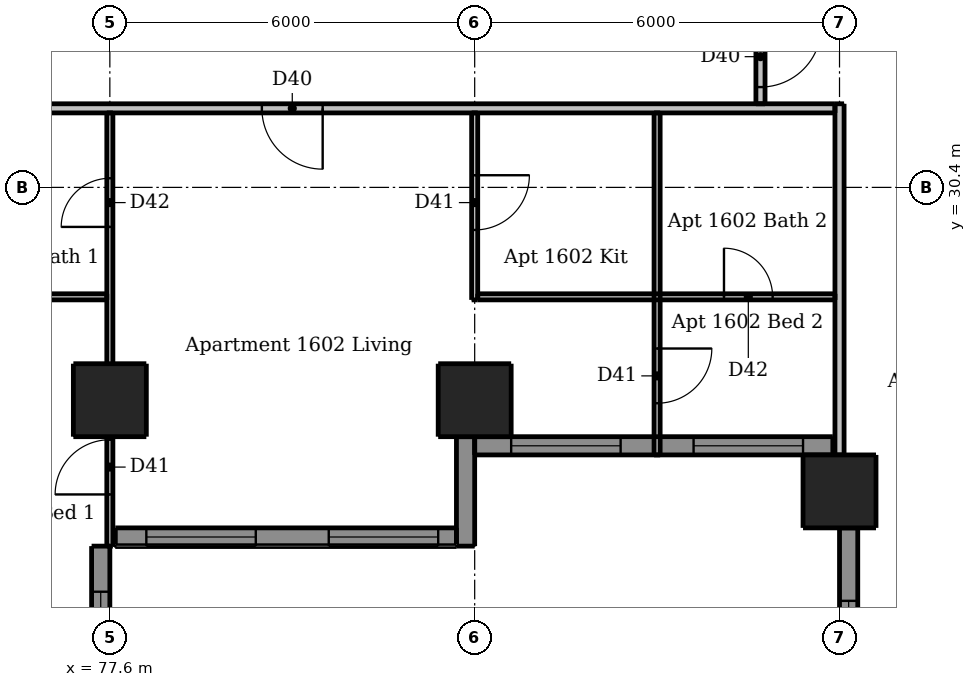
"""IFC4 building model, lengths in metres.
Left out: names, types, materials, properties, quantities, classifications, styles, units other than length and angle.
Written with IfcOpenShell. Run it as: python <this file> out.ifc"""

import sys

from ifc_helpers import new_model, si_unit, direction, frame, frame_2d, origin, origin_2d, place, context, subcontext, project, spatial, rectangle, extrude, element, fill, save


model = new_model("IFC4")
c1 = context("Model", 3, precision=1e-05, world=origin(), true_north=direction((0.0, 1.0)))
c2 = subcontext(c1, "Body", "Model", "MODEL_VIEW")
j1 = project(units=[si_unit("LENGTHUNIT", "METRE"), si_unit("PLANEANGLEUNIT", "RADIAN")], contexts=[c1])
p1 = place(None, origin())
s1 = spatial("IfcSite", under=j1, at=p1, CompositionType="ELEMENT")
p2 = place(p1, origin())
s2 = spatial("IfcBuilding", under=s1, at=p2, CompositionType="ELEMENT")
p3 = place(p2, frame((0.0, 0.0, 59.8)))
s3 = spatial("IfcBuildingStorey", under=s2, at=p3, CompositionType="ELEMENT", Elevation=59.8)
for number, where, z_axis, x_axis in (
    (1, (77.6, 26.9, 0.0), (0.0, 0.0, 1.0), (1.0, 0.0, 0.0)),
    (2, (83.6, 26.9, 0.0), (0.0, 0.0, 1.0), (1.0, 0.0, 0.0)),
    (3, (89.6, 25.4, 0.0), (0.0, 0.0, 1.0), (1.0, 0.0, 0.0)),
):
    element("IfcColumn", number, at=place(p3, frame(where, z_axis=z_axis, x_axis=x_axis)), inside=s3, PredefinedType="COLUMN", context=c2, shape_type="SweptSolid", body=[
        extrude(rectangle(XDim=1.2, YDim=1.2, at=origin_2d()), origin(), (0.0, 0.0, 1.0), 3.05),
    ])
p4 = place(p3, frame((77.45, 21.5, 0.0), z_axis=(0.0, 0.0, 1.0), x_axis=(0.0, 1.0, 0.0)))
e4 = element("IfcWall", 4, at=p4, inside=s3, PredefinedType="SOLIDWALL", context=c2, shape_type="SweptSolid", body=[
    extrude(rectangle(XDim=3.0, YDim=0.3, at=frame_2d((1.5, 0.0))), origin(), (0.0, 0.0, 1.0), 3.05),
])
p5 = place(p4, frame((0.75, 0.0, 0.9)))
e5 = element("IfcOpeningElement", 5, at=p5, cuts=e4, PredefinedType="OPENING", context=c2, shape_type="SweptSolid", body=[
    extrude(rectangle(XDim=1.5, YDim=1.5, at=frame_2d((0.75, 0.75))), frame((0.0, 0.16, 0.0), z_axis=(0.0, -1.0, 0.0), x_axis=(1.0, 0.0, 0.0)), (0.0, 0.0, 1.0), 0.32),
])
p6 = place(p3, frame((83.45, 24.5, 0.0), z_axis=(0.0, 0.0, 1.0), x_axis=(0.0, 1.0, 0.0)))
e6 = element("IfcWall", 6, at=p6, inside=s3, PredefinedType="SOLIDWALL", context=c2, shape_type="SweptSolid", body=[
    extrude(rectangle(XDim=1.8, YDim=0.3, at=frame_2d((0.9, 0.0))), origin(), (0.0, 0.0, 1.0), 3.05),
])
p7 = place(p3, frame((89.75, 24.8, 0.0), z_axis=(0.0, 0.0, 1.0), x_axis=(0.0, -1.0, 0.0)))
e7 = element("IfcWall", 7, at=p7, inside=s3, PredefinedType="SOLIDWALL", context=c2, shape_type="SweptSolid", body=[
    extrude(rectangle(XDim=4.8, YDim=0.3, at=frame_2d((2.4, 0.0))), origin(), (0.0, 0.0, 1.0), 3.05),
])
p8 = place(p7, frame((1.2, 0.0, 0.15)))
e8 = element("IfcOpeningElement", 8, at=p8, cuts=e7, PredefinedType="OPENING", context=c2, shape_type="SweptSolid", body=[
    extrude(rectangle(XDim=2.4, YDim=2.1, at=frame_2d((1.2, 1.05))), frame((0.0, 0.16, 0.0), z_axis=(0.0, -1.0, 0.0), x_axis=(1.0, 0.0, 0.0)), (0.0, 0.0, 1.0), 0.32),
])
p9 = place(p3, frame((77.69, 24.65, 0.0), z_axis=(0.0, 0.0, 1.0), x_axis=(1.0, 0.0, 0.0)))
e9 = element("IfcWall", 9, at=p9, inside=s3, PredefinedType="SOLIDWALL", context=c2, shape_type="SweptSolid", body=[
    extrude(rectangle(XDim=5.61, YDim=0.3, at=frame_2d((2.805, 0.0))), origin(), (0.0, 0.0, 1.0), 3.05),
])
p10 = place(p9, frame((0.51, 0.0, 0.15)))
e10 = element("IfcOpeningElement", 10, at=p10, cuts=e9, PredefinedType="OPENING", context=c2, shape_type="SweptSolid", body=[
    extrude(rectangle(XDim=1.8, YDim=2.1, at=frame_2d((0.9, 1.05))), frame((0.0, 0.16, 0.0), z_axis=(0.0, -1.0, 0.0), x_axis=(1.0, 0.0, 0.0)), (0.0, 0.0, 1.0), 0.32),
])
p11 = place(p9, frame((3.51, 0.0, 0.15)))
e11 = element("IfcOpeningElement", 11, at=p11, cuts=e9, PredefinedType="OPENING", context=c2, shape_type="SweptSolid", body=[
    extrude(rectangle(XDim=1.8, YDim=2.1, at=frame_2d((0.9, 1.05))), frame((0.0, 0.16, 0.0), z_axis=(0.0, -1.0, 0.0), x_axis=(1.0, 0.0, 0.0)), (0.0, 0.0, 1.0), 0.32),
])
p12 = place(p3, frame((83.6, 26.15, 0.0), z_axis=(0.0, 0.0, 1.0), x_axis=(1.0, 0.0, 0.0)))
e12 = element("IfcWall", 12, at=p12, inside=s3, PredefinedType="SOLIDWALL", context=c2, shape_type="SweptSolid", body=[
    extrude(rectangle(XDim=5.89, YDim=0.3, at=frame_2d((2.945, 0.0))), origin(), (0.0, 0.0, 1.0), 3.05),
])
p13 = place(p12, frame((0.6, 0.0, 0.15)))
e13 = element("IfcOpeningElement", 13, at=p13, cuts=e12, PredefinedType="OPENING", context=c2, shape_type="SweptSolid", body=[
    extrude(rectangle(XDim=1.8, YDim=2.1, at=frame_2d((0.9, 1.05))), frame((0.0, 0.16, 0.0), z_axis=(0.0, -1.0, 0.0), x_axis=(1.0, 0.0, 0.0)), (0.0, 0.0, 1.0), 0.32),
])
p14 = place(p12, frame((3.6, 0.0, 0.15)))
e14 = element("IfcOpeningElement", 14, at=p14, cuts=e12, PredefinedType="OPENING", context=c2, shape_type="SweptSolid", body=[
    extrude(rectangle(XDim=1.8, YDim=2.1, at=frame_2d((0.9, 1.05))), frame((0.0, 0.16, 0.0), z_axis=(0.0, -1.0, 0.0), x_axis=(1.0, 0.0, 0.0)), (0.0, 0.0, 1.0), 0.32),
])
p15 = place(p3, frame((77.6, 24.5, 0.0), z_axis=(0.0, 0.0, 1.0), x_axis=(0.0, 1.0, 0.0)))
e15 = element("IfcWall", 15, at=p15, inside=s3, PredefinedType="PARTITIONING", context=c2, shape_type="SweptSolid", body=[
    extrude(rectangle(XDim=7.125, YDim=0.1, at=frame_2d((3.562, 0.0))), origin(), (0.0, 0.0, 1.0), 2.59),
])
p16 = place(p15, frame((0.85, 0.0, 0.0)))
e16 = element("IfcOpeningElement", 16, at=p16, cuts=e15, PredefinedType="OPENING", context=c2, shape_type="SweptSolid", body=[
    extrude(rectangle(XDim=0.9, YDim=2.1, at=frame_2d((0.45, 1.05))), frame((0.0, 0.06, 0.0), z_axis=(0.0, -1.0, 0.0), x_axis=(1.0, 0.0, 0.0)), (0.0, 0.0, 1.0), 0.12),
])
p17 = place(p15, frame((5.25, 0.0, 0.0)))
e17 = element("IfcOpeningElement", 17, at=p17, cuts=e15, PredefinedType="OPENING", context=c2, shape_type="SweptSolid", body=[
    extrude(rectangle(XDim=0.8, YDim=2.1, at=frame_2d((0.4, 1.05))), frame((0.0, 0.06, 0.0), z_axis=(0.0, -1.0, 0.0), x_axis=(1.0, 0.0, 0.0)), (0.0, 0.0, 1.0), 0.12),
])
p18 = place(p3, frame((83.6, 31.625, 0.0), z_axis=(0.0, 0.0, 1.0), x_axis=(0.0, -1.0, 0.0)))
e18 = element("IfcWall", 18, at=p18, inside=s3, PredefinedType="PARTITIONING", context=c2, shape_type="SweptSolid", body=[
    extrude(rectangle(XDim=3.075, YDim=0.1, at=frame_2d((1.538, 0.0))), origin(), (0.0, 0.0, 1.0), 2.647),
])
p19 = place(p18, frame((1.025, 0.0, 0.0)))
e19 = element("IfcOpeningElement", 19, at=p19, cuts=e18, PredefinedType="OPENING", context=c2, shape_type="SweptSolid", body=[
    extrude(rectangle(XDim=0.9, YDim=2.1, at=frame_2d((0.45, 1.05))), frame((0.0, 0.06, 0.0), z_axis=(0.0, -1.0, 0.0), x_axis=(1.0, 0.0, 0.0)), (0.0, 0.0, 1.0), 0.12),
])
p20 = place(p3, frame((86.6, 31.625, 0.0), z_axis=(0.0, 0.0, 1.0), x_axis=(0.0, -1.0, 0.0)))
e20 = element("IfcWall", 20, at=p20, inside=s3, PredefinedType="PARTITIONING", context=c2, shape_type="SweptSolid", body=[
    extrude(rectangle(XDim=5.625, YDim=0.1, at=frame_2d((2.812, 0.0))), origin(), (0.0, 0.0, 1.0), 3.05),
])
p21 = place(p20, frame((3.875, 0.0, 0.0)))
e21 = element("IfcOpeningElement", 21, at=p21, cuts=e20, PredefinedType="OPENING", context=c2, shape_type="SweptSolid", body=[
    extrude(rectangle(XDim=0.9, YDim=2.1, at=frame_2d((0.45, 1.05))), frame((0.0, 0.06, 0.0), z_axis=(0.0, -1.0, 0.0), x_axis=(1.0, 0.0, 0.0)), (0.0, 0.0, 1.0), 0.12),
])
p22 = place(p3, frame((74.675, 28.6, 0.0), z_axis=(0.0, 0.0, 1.0), x_axis=(1.0, 0.0, 0.0)))
e22 = element("IfcWall", 22, at=p22, inside=s3, PredefinedType="PARTITIONING", context=c2, shape_type="SweptSolid", body=[
    extrude(rectangle(XDim=2.875, YDim=0.1, at=frame_2d((1.438, 0.0))), origin(), (0.0, 0.0, 1.0), 3.05),
])
p23 = place(p3, frame((83.65, 28.6, 0.0), z_axis=(0.0, 0.0, 1.0), x_axis=(1.0, 0.0, 0.0)))
e23 = element("IfcWall", 23, at=p23, inside=s3, PredefinedType="PARTITIONING", context=c2, shape_type="SweptSolid", body=[
    extrude(rectangle(XDim=5.875, YDim=0.1, at=frame_2d((2.938, 0.0))), origin(), (0.0, 0.0, 1.0), 3.05),
])
p24 = place(p23, frame((4.05, 0.0, 0.0)))
e24 = element("IfcOpeningElement", 24, at=p24, cuts=e23, PredefinedType="OPENING", context=c2, shape_type="SweptSolid", body=[
    extrude(rectangle(XDim=0.8, YDim=2.1, at=frame_2d((0.4, 1.05))), frame((0.0, 0.06, 0.0), z_axis=(0.0, -1.0, 0.0), x_axis=(1.0, 0.0, 0.0)), (0.0, 0.0, 1.0), 0.12),
])
p25 = place(p3, frame((88.3, 60.475, 0.0), z_axis=(0.0, 0.0, 1.0), x_axis=(0.0, -1.0, 0.0)))
e25 = element("IfcWall", 25, at=p25, inside=s3, PredefinedType="PARTITIONING", context=c2, shape_type="SweptSolid", body=[
    extrude(rectangle(XDim=28.7, YDim=0.15, at=frame_2d((14.35, 0.0))), origin(), (0.0, 0.0, 1.0), 3.05),
])
p26 = place(p25, frame((27.425, 0.0, 0.0)))
e26 = element("IfcOpeningElement", 26, at=p26, cuts=e25, PredefinedType="OPENING", context=c2, shape_type="SweptSolid", body=[
    extrude(rectangle(XDim=1.0, YDim=2.1, at=frame_2d((0.5, 1.05))), frame((0.0, 0.085, 0.0), z_axis=(0.0, -1.0, 0.0), x_axis=(1.0, 0.0, 0.0)), (0.0, 0.0, 1.0), 0.17),
])
p27 = place(p25, frame((14.525, 0.0, 0.0)))
e27 = element("IfcOpeningElement", 27, at=p27, cuts=e25, PredefinedType="OPENING", context=c2, shape_type="SweptSolid", body=[
    extrude(rectangle(XDim=1.0, YDim=2.1, at=frame_2d((0.5, 1.05))), frame((0.0, 0.085, 0.0), z_axis=(0.0, -1.0, 0.0), x_axis=(1.0, 0.0, 0.0)), (0.0, 0.0, 1.0), 0.17),
])
p28 = place(p25, frame((3.775, 0.0, 0.0)))
e28 = element("IfcOpeningElement", 28, at=p28, cuts=e25, PredefinedType="OPENING", context=c2, shape_type="SweptSolid", body=[
    extrude(rectangle(XDim=1.0, YDim=2.1, at=frame_2d((0.5, 1.05))), frame((0.0, 0.085, 0.0), z_axis=(0.0, -1.0, 0.0), x_axis=(1.0, 0.0, 0.0)), (0.0, 0.0, 1.0), 0.17),
])
p29 = place(p3, frame((89.6, 26.0, 0.0), z_axis=(0.0, 0.0, 1.0), x_axis=(0.0, 1.0, 0.0)))
e29 = element("IfcWall", 29, at=p29, inside=s3, PredefinedType="PARTITIONING", context=c2, shape_type="SweptSolid", body=[
    extrude(rectangle(XDim=5.775, YDim=0.15, at=frame_2d((2.887, 0.0))), origin(), (0.0, 0.0, 1.0), 2.516),
])
p30 = place(p3, frame((89.525, 31.7, 0.0), z_axis=(0.0, 0.0, 1.0), x_axis=(-1.0, 0.0, 0.0)))
e30 = element("IfcWall", 30, at=p30, inside=s3, PredefinedType="PARTITIONING", context=c2, shape_type="SweptSolid", body=[
    extrude(rectangle(XDim=28.75, YDim=0.15, at=frame_2d((14.375, 0.0))), origin(), (0.0, 0.0, 1.0), 3.05),
])
p31 = place(p30, frame((24.625, 0.0, 0.0)))
e31 = element("IfcOpeningElement", 31, at=p31, cuts=e30, PredefinedType="OPENING", context=c2, shape_type="SweptSolid", body=[
    extrude(rectangle(XDim=1.0, YDim=2.1, at=frame_2d((0.5, 1.05))), frame((0.0, 0.085, 0.0), z_axis=(0.0, -1.0, 0.0), x_axis=(1.0, 0.0, 0.0)), (0.0, 0.0, 1.0), 0.17),
])
p32 = place(p30, frame((8.425, 0.0, 0.0)))
e32 = element("IfcOpeningElement", 32, at=p32, cuts=e30, PredefinedType="OPENING", context=c2, shape_type="SweptSolid", body=[
    extrude(rectangle(XDim=1.0, YDim=2.1, at=frame_2d((0.5, 1.05))), frame((0.0, 0.085, 0.0), z_axis=(0.0, -1.0, 0.0), x_axis=(1.0, 0.0, 0.0)), (0.0, 0.0, 1.0), 0.17),
])
p33 = place(p5, origin())
e33 = element("IfcWindow", 33, at=p33, inside=s3, PartitioningType="DOUBLE_PANEL_VERTICAL", PredefinedType="WINDOW", context=c2, shape_type="SweptSolid", body=[
    extrude(rectangle(XDim=1.5, YDim=1.5, at=frame_2d((0.75, 0.75))), frame((0.0, 0.03, 0.0), z_axis=(0.0, -1.0, 0.0), x_axis=(1.0, 0.0, 0.0)), (0.0, 0.0, 1.0), 0.06),
])
fill(e5, e33)
p34 = place(p8, origin())
e34 = element("IfcWindow", 34, at=p34, inside=s3, PartitioningType="DOUBLE_PANEL_VERTICAL", PredefinedType="WINDOW", context=c2, shape_type="SweptSolid", body=[
    extrude(rectangle(XDim=2.4, YDim=2.1, at=frame_2d((1.2, 1.05))), frame((0.0, 0.03, 0.0), z_axis=(0.0, -1.0, 0.0), x_axis=(1.0, 0.0, 0.0)), (0.0, 0.0, 1.0), 0.06),
])
fill(e8, e34)
p35 = place(p10, origin())
e35 = element("IfcWindow", 35, at=p35, inside=s3, PartitioningType="DOUBLE_PANEL_VERTICAL", PredefinedType="WINDOW", context=c2, shape_type="SweptSolid", body=[
    extrude(rectangle(XDim=1.8, YDim=2.1, at=frame_2d((0.9, 1.05))), frame((0.0, 0.03, 0.0), z_axis=(0.0, -1.0, 0.0), x_axis=(1.0, 0.0, 0.0)), (0.0, 0.0, 1.0), 0.06),
])
fill(e10, e35)
p36 = place(p11, origin())
e36 = element("IfcWindow", 36, at=p36, inside=s3, PartitioningType="DOUBLE_PANEL_VERTICAL", PredefinedType="WINDOW", context=c2, shape_type="SweptSolid", body=[
    extrude(rectangle(XDim=1.8, YDim=2.1, at=frame_2d((0.9, 1.05))), frame((0.0, 0.03, 0.0), z_axis=(0.0, -1.0, 0.0), x_axis=(1.0, 0.0, 0.0)), (0.0, 0.0, 1.0), 0.06),
])
fill(e11, e36)
p37 = place(p13, origin())
e37 = element("IfcWindow", 37, at=p37, inside=s3, PartitioningType="DOUBLE_PANEL_VERTICAL", PredefinedType="WINDOW", context=c2, shape_type="SweptSolid", body=[
    extrude(rectangle(XDim=1.8, YDim=2.1, at=frame_2d((0.9, 1.05))), frame((0.0, 0.03, 0.0), z_axis=(0.0, -1.0, 0.0), x_axis=(1.0, 0.0, 0.0)), (0.0, 0.0, 1.0), 0.06),
])
fill(e13, e37)
p38 = place(p14, origin())
e38 = element("IfcWindow", 38, at=p38, inside=s3, PartitioningType="DOUBLE_PANEL_VERTICAL", PredefinedType="WINDOW", context=c2, shape_type="SweptSolid", body=[
    extrude(rectangle(XDim=1.8, YDim=2.1, at=frame_2d((0.9, 1.05))), frame((0.0, 0.03, 0.0), z_axis=(0.0, -1.0, 0.0), x_axis=(1.0, 0.0, 0.0)), (0.0, 0.0, 1.0), 0.06),
])
fill(e14, e38)
p39 = place(p32, origin())
e39 = element("IfcDoor", 39, at=p39, inside=s3, OperationType="SINGLE_SWING_LEFT", PredefinedType="DOOR", context=c2, shape_type="SweptSolid", body=[
    extrude(rectangle(XDim=1.0, YDim=2.1, at=frame_2d((0.5, 1.05))), frame((0.0, 0.025, 0.0), z_axis=(0.0, -1.0, 0.0), x_axis=(1.0, 0.0, 0.0)), (0.0, 0.0, 1.0), 0.05),
])
fill(e32, e39)
p40 = place(p19, origin())
e40 = element("IfcDoor", 40, at=p40, inside=s3, OperationType="SINGLE_SWING_LEFT", PredefinedType="DOOR", context=c2, shape_type="SweptSolid", body=[
    extrude(rectangle(XDim=0.9, YDim=2.1, at=frame_2d((0.45, 1.05))), frame((0.0, 0.025, 0.0), z_axis=(0.0, -1.0, 0.0), x_axis=(1.0, 0.0, 0.0)), (0.0, 0.0, 1.0), 0.05),
])
fill(e19, e40)
p41 = place(p16, origin())
e41 = element("IfcDoor", 41, at=p41, inside=s3, OperationType="SINGLE_SWING_LEFT", PredefinedType="DOOR", context=c2, shape_type="SweptSolid", body=[
    extrude(rectangle(XDim=0.9, YDim=2.1, at=frame_2d((0.45, 1.05))), frame((0.0, 0.025, 0.0), z_axis=(0.0, -1.0, 0.0), x_axis=(1.0, 0.0, 0.0)), (0.0, 0.0, 1.0), 0.05),
])
fill(e16, e41)
p42 = place(p17, origin())
e42 = element("IfcDoor", 42, at=p42, inside=s3, OperationType="SINGLE_SWING_LEFT", PredefinedType="DOOR", context=c2, shape_type="SweptSolid", body=[
    extrude(rectangle(XDim=0.8, YDim=2.1, at=frame_2d((0.4, 1.05))), frame((0.0, 0.025, 0.0), z_axis=(0.0, -1.0, 0.0), x_axis=(1.0, 0.0, 0.0)), (0.0, 0.0, 1.0), 0.05),
])
fill(e17, e42)
p43 = place(p21, origin())
e43 = element("IfcDoor", 43, at=p43, inside=s3, OperationType="SINGLE_SWING_LEFT", PredefinedType="DOOR", context=c2, shape_type="SweptSolid", body=[
    extrude(rectangle(XDim=0.9, YDim=2.1, at=frame_2d((0.45, 1.05))), frame((0.0, 0.025, 0.0), z_axis=(0.0, -1.0, 0.0), x_axis=(1.0, 0.0, 0.0)), (0.0, 0.0, 1.0), 0.05),
])
fill(e21, e43)
p44 = place(p24, origin())
e44 = element("IfcDoor", 44, at=p44, inside=s3, OperationType="SINGLE_SWING_LEFT", PredefinedType="DOOR", context=c2, shape_type="SweptSolid", body=[
    extrude(rectangle(XDim=0.8, YDim=2.1, at=frame_2d((0.4, 1.05))), frame((0.0, 0.025, 0.0), z_axis=(0.0, -1.0, 0.0), x_axis=(1.0, 0.0, 0.0)), (0.0, 0.0, 1.0), 0.05),
])
fill(e24, e44)
p45 = place(p26, origin())
e45 = element("IfcDoor", 45, at=p45, inside=s3, OperationType="SINGLE_SWING_LEFT", PredefinedType="DOOR", context=c2, shape_type="SweptSolid", body=[
    extrude(rectangle(XDim=1.0, YDim=2.1, at=frame_2d((0.5, 1.05))), frame((0.0, 0.025, 0.0), z_axis=(0.0, -1.0, 0.0), x_axis=(1.0, 0.0, 0.0)), (0.0, 0.0, 1.0), 0.05),
])
fill(e26, e45)
save(model, sys.argv[1])
